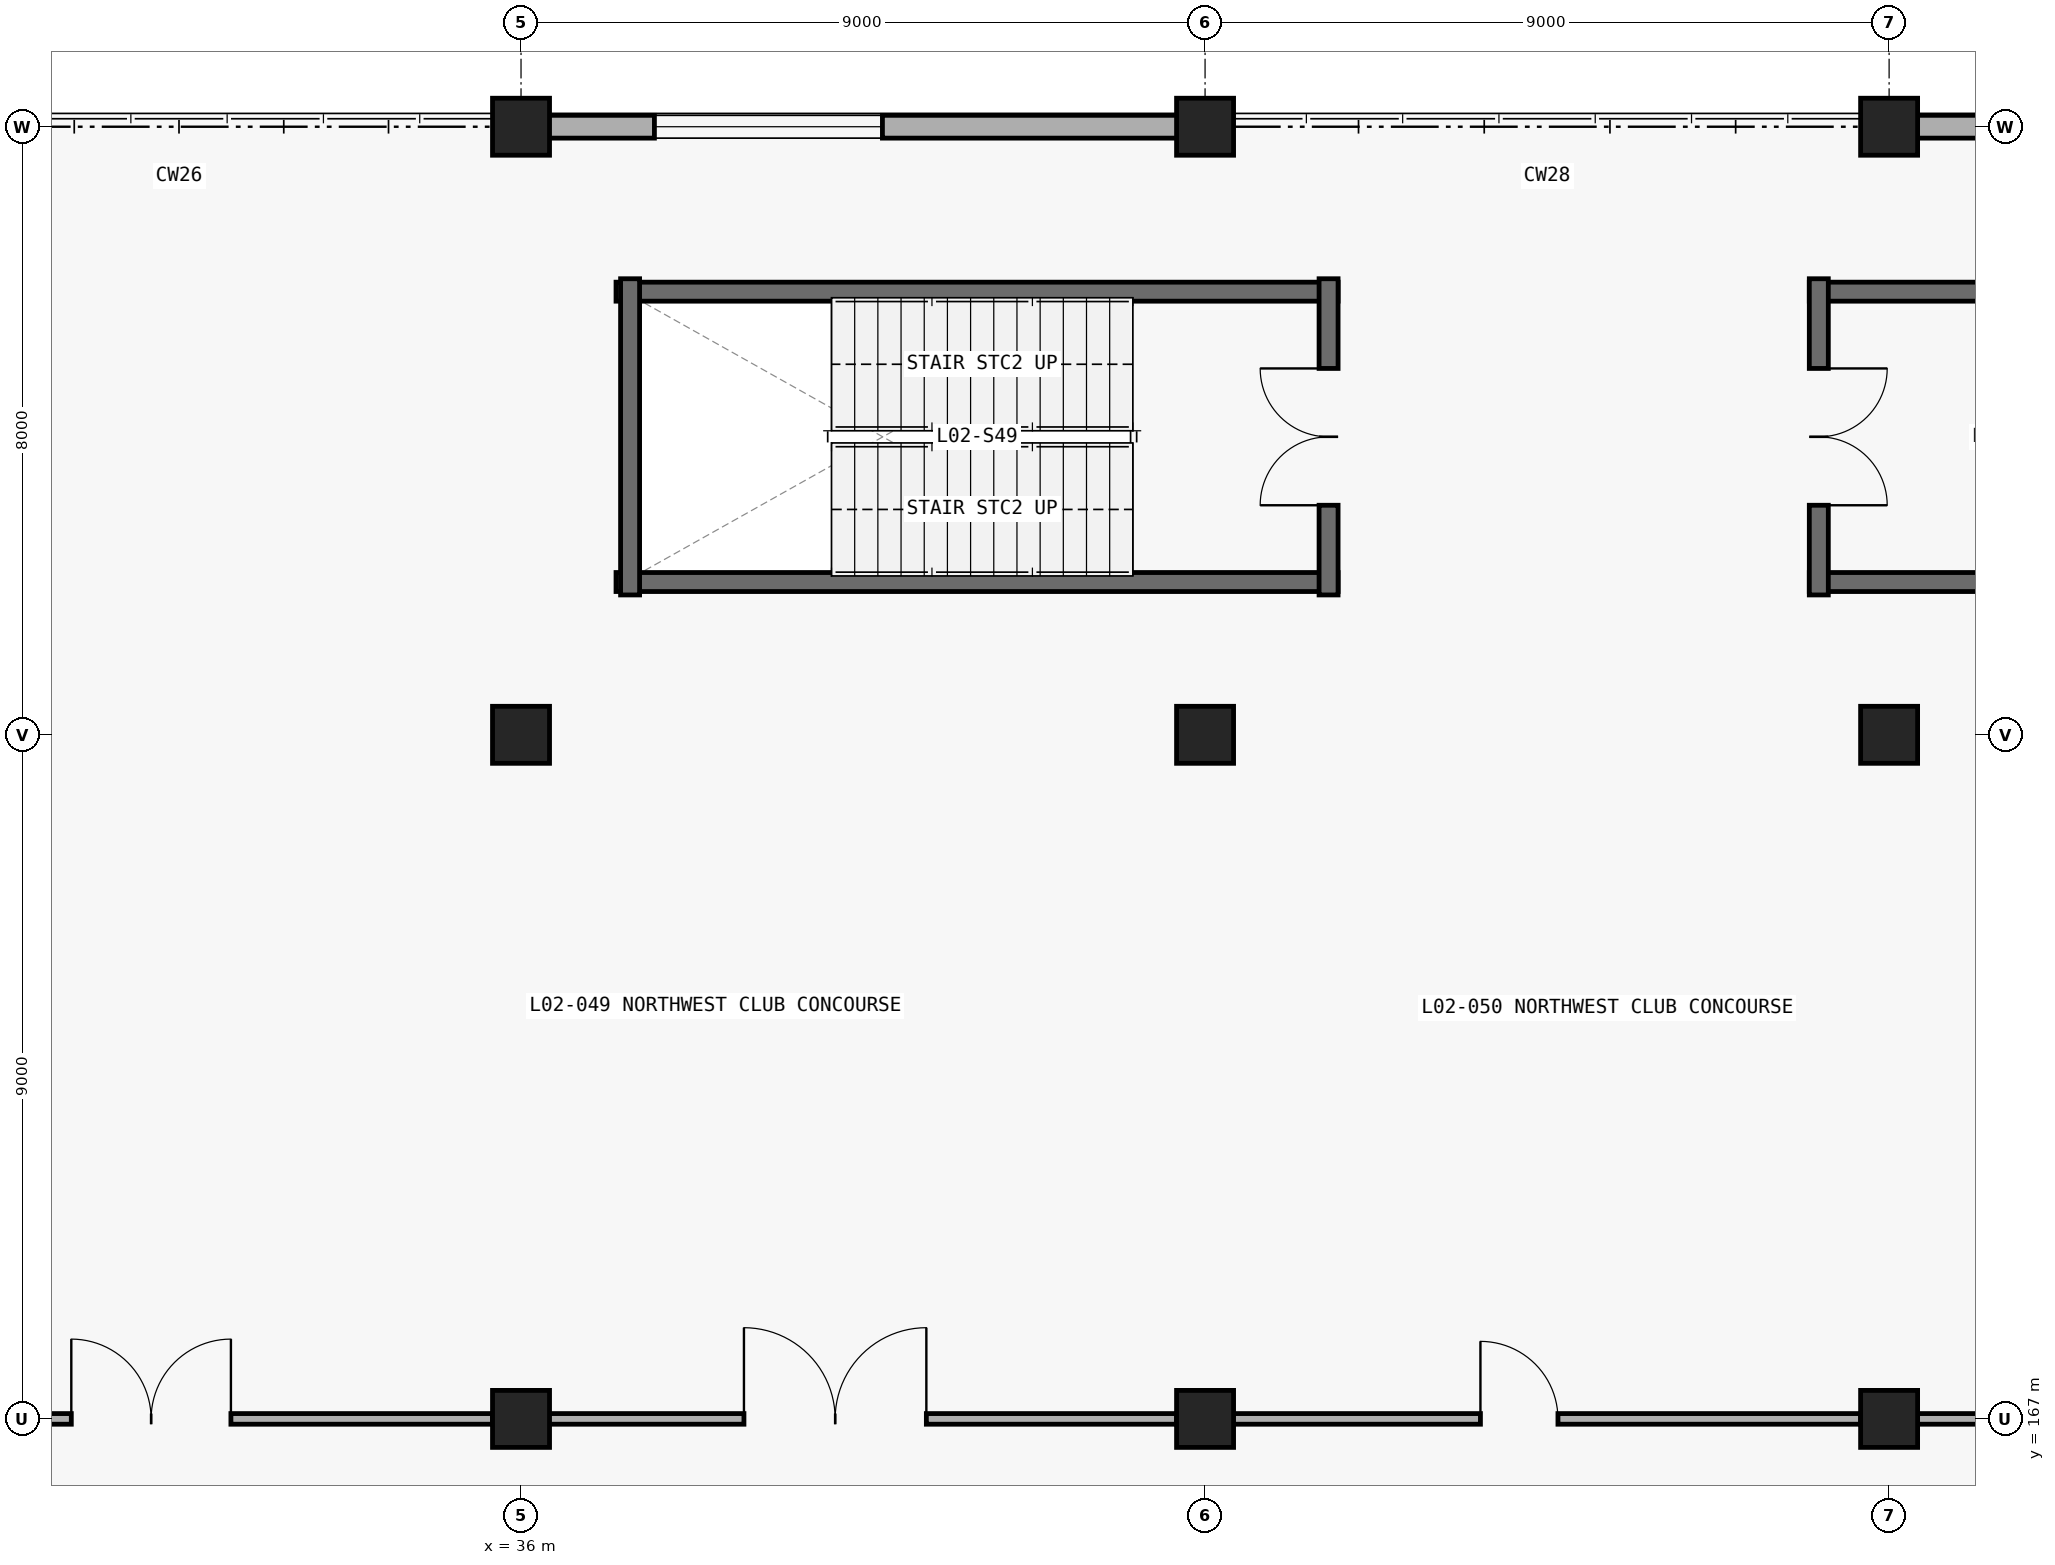
"""IFC4 building model, lengths in metres.
Left out: names, types, materials, properties, quantities, classifications, styles, units other than length and angle.
Written with IfcOpenShell. Run it as: python <this file> out.ifc"""

import sys

from ifc_helpers import new_model, si_unit, direction, frame, frame_2d, origin, origin_2d, place, context, subcontext, project, spatial, rectangle, extrude, element, fill, save


model = new_model("IFC4")
c1 = context("Model", 3, precision=1e-05, world=origin(), true_north=direction((0.0, 1.0)))
c2 = subcontext(c1, "Body", "Model", "MODEL_VIEW")
j1 = project(units=[si_unit("LENGTHUNIT", "METRE"), si_unit("PLANEANGLEUNIT", "RADIAN")], contexts=[c1])
p1 = place(None, origin())
s1 = spatial("IfcSite", under=j1, at=p1, CompositionType="ELEMENT")
p2 = place(p1, origin())
s2 = spatial("IfcBuilding", under=s1, at=p2, CompositionType="ELEMENT")
p3 = place(p2, frame((0.0, 0.0, 10.2)))
s3 = spatial("IfcBuildingStorey", under=s2, at=p3, CompositionType="ELEMENT", Elevation=10.2)
for number, where, z_axis, x_axis in (
    (1, (36.0, 167.0, 0.0), (0.0, 0.0, 1.0), (1.0, 0.0, 0.0)),
    (2, (36.0, 176.0, 0.0), (0.0, 0.0, 1.0), (1.0, 0.0, 0.0)),
    (3, (36.0, 184.0, 0.0), (0.0, 0.0, 1.0), (1.0, 0.0, 0.0)),
    (4, (45.0, 167.0, 0.0), (0.0, 0.0, 1.0), (1.0, 0.0, 0.0)),
    (5, (45.0, 176.0, 0.0), (0.0, 0.0, 1.0), (1.0, 0.0, 0.0)),
    (6, (45.0, 184.0, 0.0), (0.0, 0.0, 1.0), (1.0, 0.0, 0.0)),
    (7, (54.0, 167.0, 0.0), (0.0, 0.0, 1.0), (1.0, 0.0, 0.0)),
    (8, (54.0, 176.0, 0.0), (0.0, 0.0, 1.0), (1.0, 0.0, 0.0)),
    (9, (54.0, 184.0, 0.0), (0.0, 0.0, 1.0), (1.0, 0.0, 0.0)),
):
    element("IfcColumn", number, at=place(p3, frame(where, z_axis=z_axis, x_axis=x_axis)), inside=s3, PredefinedType="COLUMN", context=c2, shape_type="SweptSolid", body=[
        extrude(rectangle(XDim=0.75, YDim=0.75, at=origin_2d()), origin(), (0.0, 0.0, 1.0), 4.8),
    ])
p4 = place(p3, frame((36.35, 184.0, 0.0), z_axis=(0.0, 0.0, 1.0), x_axis=(1.0, 0.0, 0.0)))
e10 = element("IfcWall", 10, at=p4, inside=s3, PredefinedType="STANDARD", context=c2, shape_type="SweptSolid", body=[
    extrude(rectangle(XDim=8.3, YDim=0.3, at=frame_2d((4.15, 0.0))), origin(), (0.0, 0.0, 1.0), 3.855),
])
p5 = place(p4, frame((1.405, 0.0, 0.95)))
e11 = element("IfcOpeningElement", 11, at=p5, cuts=e10, PredefinedType="OPENING", context=c2, shape_type="SweptSolid", body=[
    extrude(rectangle(XDim=3.0, YDim=2.3, at=frame_2d((1.5, 1.15))), frame((0.0, 0.16, 0.0), z_axis=(0.0, -1.0, 0.0), x_axis=(1.0, 0.0, 0.0)), (0.0, 0.0, 1.0), 0.32),
])
p6 = place(p3, frame((54.35, 184.0, 0.0), z_axis=(0.0, 0.0, 1.0), x_axis=(1.0, 0.0, 0.0)))
e12 = element("IfcWall", 12, at=p6, inside=s3, PredefinedType="STANDARD", context=c2, shape_type="SweptSolid", body=[
    extrude(rectangle(XDim=8.3, YDim=0.3, at=frame_2d((4.15, 0.0))), origin(), (0.0, 0.0, 1.0), 3.855),
])
p7 = place(p6, frame((2.305, 0.0, 0.95)))
e13 = element("IfcOpeningElement", 13, at=p7, cuts=e12, PredefinedType="OPENING", context=c2, shape_type="SweptSolid", body=[
    extrude(rectangle(XDim=1.2, YDim=1.8, at=frame_2d((0.6, 0.9))), frame((0.0, 0.16, 0.0), z_axis=(0.0, -1.0, 0.0), x_axis=(1.0, 0.0, 0.0)), (0.0, 0.0, 1.0), 0.32),
])
for number, where, z_axis, x_axis in (
    (14, (46.75, 181.83, 0.0), (0.0, 0.0, 1.0), (-1.0, 0.0, 0.0)),
    (15, (37.25, 178.01, 0.0), (0.0, 0.0, 1.0), (1.0, 0.0, 0.0)),
):
    element("IfcWall", number, at=place(p3, frame(where, z_axis=z_axis, x_axis=x_axis)), inside=s3, PredefinedType="SHEAR", context=c2, shape_type="SweptSolid", body=[
        extrude(rectangle(XDim=9.5, YDim=0.25, at=frame_2d((4.75, 0.0))), origin(), (0.0, 0.0, 1.0), 4.5),
    ])
p8 = place(p3, frame((46.625, 177.84, 0.0), z_axis=(0.0, 0.0, 1.0), x_axis=(0.0, 1.0, 0.0)))
e16 = element("IfcWall", 16, at=p8, inside=s3, PredefinedType="SHEAR", context=c2, shape_type="SweptSolid", body=[
    extrude(rectangle(XDim=4.16, YDim=0.25, at=frame_2d((2.08, 0.0))), origin(), (0.0, 0.0, 1.0), 4.5),
])
p9 = place(p8, frame((1.18, 0.0, 0.0)))
e17 = element("IfcOpeningElement", 17, at=p9, cuts=e16, PredefinedType="OPENING", context=c2, shape_type="SweptSolid", body=[
    extrude(rectangle(XDim=1.8, YDim=2.25, at=frame_2d((0.9, 1.125))), frame((0.0, 0.135, 0.0), z_axis=(0.0, -1.0, 0.0), x_axis=(1.0, 0.0, 0.0)), (0.0, 0.0, 1.0), 0.27),
])
p10 = place(p3, frame((37.435, 182.0, 0.0), z_axis=(0.0, 0.0, 1.0), x_axis=(0.0, -1.0, 0.0)))
e18 = element("IfcWall", 18, at=p10, inside=s3, PredefinedType="SHEAR", context=c2, shape_type="SweptSolid", body=[
    extrude(rectangle(XDim=4.16, YDim=0.25, at=frame_2d((2.08, 0.0))), origin(), (0.0, 0.0, 1.0), 4.5),
])
for number, where, z_axis, x_axis in (
    (19, (52.95, 178.01, 0.0), (0.0, 0.0, 1.0), (1.0, 0.0, 0.0)),
    (20, (62.45, 181.83, 0.0), (0.0, 0.0, 1.0), (-1.0, 0.0, 0.0)),
):
    element("IfcWall", number, at=place(p3, frame(where, z_axis=z_axis, x_axis=x_axis)), inside=s3, PredefinedType="SHEAR", context=c2, shape_type="SweptSolid", body=[
        extrude(rectangle(XDim=9.5, YDim=0.25, at=frame_2d((4.75, 0.0))), origin(), (0.0, 0.0, 1.0), 4.5),
    ])
p11 = place(p3, frame((53.075, 182.0, 0.0), z_axis=(0.0, 0.0, 1.0), x_axis=(0.0, -1.0, 0.0)))
e21 = element("IfcWall", 21, at=p11, inside=s3, PredefinedType="SHEAR", context=c2, shape_type="SweptSolid", body=[
    extrude(rectangle(XDim=4.16, YDim=0.25, at=frame_2d((2.08, 0.0))), origin(), (0.0, 0.0, 1.0), 4.5),
])
p12 = place(p11, frame((1.18, 0.0, 0.0)))
e22 = element("IfcOpeningElement", 22, at=p12, cuts=e21, PredefinedType="OPENING", context=c2, shape_type="SweptSolid", body=[
    extrude(rectangle(XDim=1.8, YDim=2.25, at=frame_2d((0.9, 1.125))), frame((0.0, 0.135, 0.0), z_axis=(0.0, -1.0, 0.0), x_axis=(1.0, 0.0, 0.0)), (0.0, 0.0, 1.0), 0.27),
])
p13 = place(p3, frame((26.625, 167.0, 0.0), z_axis=(0.0, 0.0, 1.0), x_axis=(1.0, 0.0, 0.0)))
e23 = element("IfcWall", 23, at=p13, inside=s3, PredefinedType="PARTITIONING", context=c2, shape_type="SweptSolid", body=[
    extrude(rectangle(XDim=9.015, YDim=0.14, at=frame_2d((4.507, 0.0))), origin(), (0.0, 0.0, 1.0), 3.855),
])
p14 = place(p13, frame((3.458, 0.0, 0.0)))
e24 = element("IfcOpeningElement", 24, at=p14, cuts=e23, PredefinedType="OPENING", context=c2, shape_type="SweptSolid", body=[
    extrude(rectangle(XDim=2.1, YDim=2.35, at=frame_2d((1.05, 1.175))), frame((0.0, 0.08, 0.0), z_axis=(0.0, -1.0, 0.0), x_axis=(1.0, 0.0, 0.0)), (0.0, 0.0, 1.0), 0.16),
])
p15 = place(p3, frame((35.625, 167.0, 0.0), z_axis=(0.0, 0.0, 1.0), x_axis=(1.0, 0.0, 0.0)))
e25 = element("IfcWall", 25, at=p15, inside=s3, PredefinedType="PARTITIONING", context=c2, shape_type="SweptSolid", body=[
    extrude(rectangle(XDim=9.015, YDim=0.14, at=frame_2d((4.507, 0.0))), origin(), (0.0, 0.0, 1.0), 3.855),
])
p16 = place(p15, frame((3.308, 0.0, 0.0)))
e26 = element("IfcOpeningElement", 26, at=p16, cuts=e25, PredefinedType="OPENING", context=c2, shape_type="SweptSolid", body=[
    extrude(rectangle(XDim=2.4, YDim=2.4, at=frame_2d((1.2, 1.2))), frame((0.0, 0.08, 0.0), z_axis=(0.0, -1.0, 0.0), x_axis=(1.0, 0.0, 0.0)), (0.0, 0.0, 1.0), 0.16),
])
p17 = place(p3, frame((44.625, 167.0, 0.0), z_axis=(0.0, 0.0, 1.0), x_axis=(1.0, 0.0, 0.0)))
e27 = element("IfcWall", 27, at=p17, inside=s3, PredefinedType="PARTITIONING", context=c2, shape_type="SweptSolid", body=[
    extrude(rectangle(XDim=9.015, YDim=0.14, at=frame_2d((4.507, 0.0))), origin(), (0.0, 0.0, 1.0), 3.855),
])
p18 = place(p17, frame((3.998, 0.0, 0.0)))
e28 = element("IfcOpeningElement", 28, at=p18, cuts=e27, PredefinedType="OPENING", context=c2, shape_type="SweptSolid", body=[
    extrude(rectangle(XDim=1.02, YDim=2.2, at=frame_2d((0.51, 1.1))), frame((0.0, 0.08, 0.0), z_axis=(0.0, -1.0, 0.0), x_axis=(1.0, 0.0, 0.0)), (0.0, 0.0, 1.0), 0.16),
])
p19 = place(p3, frame((53.625, 167.0, 0.0), z_axis=(0.0, 0.0, 1.0), x_axis=(1.0, 0.0, 0.0)))
e29 = element("IfcWall", 29, at=p19, inside=s3, PredefinedType="PARTITIONING", context=c2, shape_type="SweptSolid", body=[
    extrude(rectangle(XDim=9.015, YDim=0.14, at=frame_2d((4.507, 0.0))), origin(), (0.0, 0.0, 1.0), 3.855),
])
p20 = place(p19, frame((3.968, 0.0, 0.0)))
e30 = element("IfcOpeningElement", 30, at=p20, cuts=e29, PredefinedType="OPENING", context=c2, shape_type="SweptSolid", body=[
    extrude(rectangle(XDim=1.08, YDim=2.2, at=frame_2d((0.54, 1.1))), frame((0.0, 0.08, 0.0), z_axis=(0.0, -1.0, 0.0), x_axis=(1.0, 0.0, 0.0)), (0.0, 0.0, 1.0), 0.16),
])
p21 = place(p5, origin())
e31 = element("IfcWindow", 31, at=p21, inside=s3, PartitioningType="SINGLE_PANEL", PredefinedType="WINDOW", context=c2, shape_type="SweptSolid", body=[
    extrude(rectangle(XDim=3.0, YDim=2.3, at=frame_2d((1.5, 1.15))), frame((0.0, 0.03, 0.0), z_axis=(0.0, -1.0, 0.0), x_axis=(1.0, 0.0, 0.0)), (0.0, 0.0, 1.0), 0.06),
])
fill(e11, e31)
p22 = place(p9, origin())
e32 = element("IfcDoor", 32, at=p22, inside=s3, OperationType="DOUBLE_DOOR_SINGLE_SWING", PredefinedType="DOOR", context=c2, shape_type="SweptSolid", body=[
    extrude(rectangle(XDim=1.8, YDim=2.25, at=frame_2d((0.9, 1.125))), frame((0.0, 0.025, 0.0), z_axis=(0.0, -1.0, 0.0), x_axis=(1.0, 0.0, 0.0)), (0.0, 0.0, 1.0), 0.05),
])
fill(e17, e32)
p23 = place(p12, origin())
e33 = element("IfcDoor", 33, at=p23, inside=s3, OperationType="DOUBLE_DOOR_SINGLE_SWING", PredefinedType="DOOR", context=c2, shape_type="SweptSolid", body=[
    extrude(rectangle(XDim=1.8, YDim=2.25, at=frame_2d((0.9, 1.125))), frame((0.0, 0.025, 0.0), z_axis=(0.0, -1.0, 0.0), x_axis=(1.0, 0.0, 0.0)), (0.0, 0.0, 1.0), 0.05),
])
fill(e22, e33)
p24 = place(p14, origin())
e34 = element("IfcDoor", 34, at=p24, inside=s3, OperationType="DOUBLE_DOOR_SINGLE_SWING", PredefinedType="DOOR", context=c2, shape_type="SweptSolid", body=[
    extrude(rectangle(XDim=2.1, YDim=2.35, at=frame_2d((1.05, 1.175))), frame((0.0, 0.025, 0.0), z_axis=(0.0, -1.0, 0.0), x_axis=(1.0, 0.0, 0.0)), (0.0, 0.0, 1.0), 0.05),
])
fill(e24, e34)
p25 = place(p16, origin())
e35 = element("IfcDoor", 35, at=p25, inside=s3, OperationType="DOUBLE_DOOR_SINGLE_SWING", PredefinedType="DOOR", context=c2, shape_type="SweptSolid", body=[
    extrude(rectangle(XDim=2.4, YDim=2.4, at=frame_2d((1.2, 1.2))), frame((0.0, 0.025, 0.0), z_axis=(0.0, -1.0, 0.0), x_axis=(1.0, 0.0, 0.0)), (0.0, 0.0, 1.0), 0.05),
])
fill(e26, e35)
p26 = place(p18, origin())
e36 = element("IfcDoor", 36, at=p26, inside=s3, OperationType="SINGLE_SWING_LEFT", PredefinedType="DOOR", context=c2, shape_type="SweptSolid", body=[
    extrude(rectangle(XDim=1.02, YDim=2.2, at=frame_2d((0.51, 1.1))), frame((0.0, 0.025, 0.0), z_axis=(0.0, -1.0, 0.0), x_axis=(1.0, 0.0, 0.0)), (0.0, 0.0, 1.0), 0.05),
])
fill(e28, e36)
save(model, sys.argv[1])
